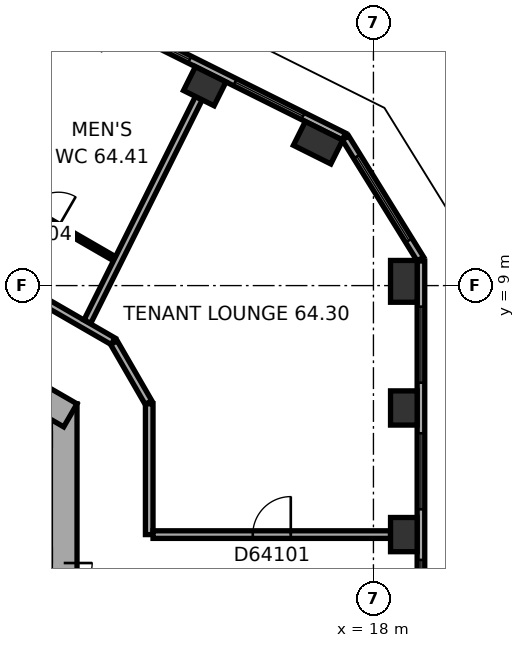
"""IFC4 building model, lengths in metres.
Left out: names, types, materials, properties, quantities, classifications, styles, units other than length and angle.
Written with IfcOpenShell. Run it as: python <this file> out.ifc"""

import sys

from ifc_helpers import new_model, si_unit, direction, frame, frame_2d, origin, origin_2d, place, context, subcontext, project, spatial, rectangle, extrude, element, fill, save


model = new_model("IFC4")
c1 = context("Model", 3, precision=1e-05, world=origin(), true_north=direction((0.0, 1.0)))
c2 = subcontext(c1, "Body", "Model", "MODEL_VIEW")
j1 = project(units=[si_unit("LENGTHUNIT", "METRE"), si_unit("PLANEANGLEUNIT", "RADIAN")], contexts=[c1])
p1 = place(None, origin())
s1 = spatial("IfcSite", under=j1, at=p1, CompositionType="ELEMENT")
p2 = place(p1, origin())
s2 = spatial("IfcBuilding", under=s1, at=p2, CompositionType="ELEMENT")
p3 = place(p2, frame((0.0, 0.0, 259.8)))
s3 = spatial("IfcBuildingStorey", under=s2, at=p3, CompositionType="ELEMENT", Elevation=259.8)
for number, where, z_axis, x_axis in (
    (1, (18.8, 2.448, 0.0), (0.0, 0.0, 1.0), (0.0, 1.0, 0.0)),
    (2, (18.8, 5.78, 0.0), (0.0, 0.0, 1.0), (0.0, 1.0, 0.0)),
):
    element("IfcColumn", number, at=place(p3, frame(where, z_axis=z_axis, x_axis=x_axis)), inside=s3, PredefinedType="COLUMN", context=c2, shape_type="SweptSolid", body=[
        extrude(rectangle(XDim=0.9, YDim=0.7, at=origin_2d()), origin(), (0.0, 0.0, 1.0), 3.7),
    ])
for number, where, z_axis, x_axis in (
    (3, (18.8, 9.112, 0.0), (0.0, 0.0, 1.0), (0.0, 1.0, 0.0)),
    (4, (16.543, 12.759, 0.0), (0.0, 0.0, 1.0), (-0.895, 0.446, 0.0)),
):
    element("IfcColumn", number, at=place(p3, frame(where, z_axis=z_axis, x_axis=x_axis)), inside=s3, PredefinedType="COLUMN", context=c2, shape_type="SweptSolid", body=[
        extrude(rectangle(XDim=1.1, YDim=0.7, at=origin_2d()), origin(), (0.0, 0.0, 1.0), 3.7),
    ])
p4 = place(p3, frame((13.561, 14.246, 0.0), z_axis=(0.0, 0.0, 1.0), x_axis=(-0.894934361602, 0.44619781311, 0.0)))
e5 = element("IfcColumn", 5, at=p4, inside=s3, PredefinedType="COLUMN", context=c2, shape_type="SweptSolid", body=[
    extrude(rectangle(XDim=0.9, YDim=0.7, at=origin_2d()), origin(), (0.0, 0.0, 1.0), 3.7),
])
p5 = place(p3, frame((9.85, -5.889, 0.0), z_axis=(0.0, 0.0, 1.0), x_axis=(0.0, 1.0, 0.0)))
e6 = element("IfcWall", 6, at=p5, inside=s3, PredefinedType="SHEAR", context=c2, shape_type="SweptSolid", body=[
    extrude(rectangle(XDim=11.778, YDim=0.7, at=frame_2d((5.889, 0.0))), origin(), (0.0, 0.0, 1.0), 3.7),
])
p6 = place(p5, frame((6.089, 0.0, 0.0)))
e7 = element("IfcOpeningElement", 7, at=p6, cuts=e6, PredefinedType="OPENING", context=c2, shape_type="SweptSolid", body=[
    extrude(rectangle(XDim=1.5, YDim=2.1, at=frame_2d((0.75, 1.05))), frame((0.0, 0.36, 0.0), z_axis=(0.0, -1.0, 0.0), x_axis=(1.0, 0.0, 0.0)), (0.0, 0.0, 1.0), 0.72),
])
p7 = place(p5, frame((2.939, 0.0, 0.0)))
e8 = element("IfcOpeningElement", 8, at=p7, cuts=e6, PredefinedType="OPENING", context=c2, shape_type="SweptSolid", body=[
    extrude(rectangle(XDim=0.9, YDim=2.1, at=frame_2d((0.45, 1.05))), frame((0.0, 0.36, 0.0), z_axis=(0.0, -1.0, 0.0), x_axis=(1.0, 0.0, 0.0)), (0.0, 0.0, 1.0), 0.72),
])
p8 = place(p3, frame((10.025, 5.586, 0.0), z_axis=(0.0, 0.0, 1.0), x_axis=(-0.866026453023, 0.499998182661, 0.0)))
e9 = element("IfcWall", 9, at=p8, inside=s3, PredefinedType="SHEAR", context=c2, shape_type="SweptSolid", body=[
    extrude(rectangle(XDim=11.778, YDim=0.7, at=frame_2d((5.889, 0.0))), origin(), (0.0, 0.0, 1.0), 3.7),
])
p9 = place(p8, frame((5.139, 0.0, 0.0)))
e10 = element("IfcOpeningElement", 10, at=p9, cuts=e9, PredefinedType="OPENING", context=c2, shape_type="SweptSolid", body=[
    extrude(rectangle(XDim=0.9, YDim=2.1, at=frame_2d((0.45, 1.05))), frame((0.0, 0.36, 0.0), z_axis=(0.0, -1.0, 0.0), x_axis=(1.0, 0.0, 0.0)), (0.0, 0.0, 1.0), 0.72),
])
p10 = place(p3, frame((19.25, -8.084, 0.0), z_axis=(0.0, 0.0, 1.0), x_axis=(0.0, 1.0, 0.0)))
e11 = element("IfcWall", 11, at=p10, inside=s3, PredefinedType="STANDARD", context=c2, shape_type="SweptSolid", body=[
    extrude(rectangle(XDim=17.731, YDim=0.2, at=frame_2d((8.866, 0.0))), origin(), (0.0, 0.0, 1.0), 3.7),
])
p11 = place(p10, frame((1.203, 0.0, 0.9)))
e12 = element("IfcOpeningElement", 12, at=p11, cuts=e11, PredefinedType="OPENING", context=c2, shape_type="SweptSolid", body=[
    extrude(rectangle(XDim=2.0, YDim=2.0, at=frame_2d((1.0, 1.0))), frame((0.0, 0.11, 0.0), z_axis=(0.0, -1.0, 0.0), x_axis=(1.0, 0.0, 0.0)), (0.0, 0.0, 1.0), 0.22),
])
p12 = place(p10, frame((4.535, 0.0, 0.9)))
e13 = element("IfcOpeningElement", 13, at=p12, cuts=e11, PredefinedType="OPENING", context=c2, shape_type="SweptSolid", body=[
    extrude(rectangle(XDim=2.0, YDim=2.0, at=frame_2d((1.0, 1.0))), frame((0.0, 0.11, 0.0), z_axis=(0.0, -1.0, 0.0), x_axis=(1.0, 0.0, 0.0)), (0.0, 0.0, 1.0), 0.22),
])
p13 = place(p10, frame((7.866, 0.0, 0.9)))
e14 = element("IfcOpeningElement", 14, at=p13, cuts=e11, PredefinedType="OPENING", context=c2, shape_type="SweptSolid", body=[
    extrude(rectangle(XDim=2.0, YDim=2.0, at=frame_2d((1.0, 1.0))), frame((0.0, 0.11, 0.0), z_axis=(0.0, -1.0, 0.0), x_axis=(1.0, 0.0, 0.0)), (0.0, 0.0, 1.0), 0.22),
])
p14 = place(p10, frame((11.198, 0.0, 0.9)))
e15 = element("IfcOpeningElement", 15, at=p14, cuts=e11, PredefinedType="OPENING", context=c2, shape_type="SweptSolid", body=[
    extrude(rectangle(XDim=2.0, YDim=2.0, at=frame_2d((1.0, 1.0))), frame((0.0, 0.11, 0.0), z_axis=(0.0, -1.0, 0.0), x_axis=(1.0, 0.0, 0.0)), (0.0, 0.0, 1.0), 0.22),
])
p15 = place(p10, frame((14.53, 0.0, 0.9)))
e16 = element("IfcOpeningElement", 16, at=p15, cuts=e11, PredefinedType="OPENING", context=c2, shape_type="SweptSolid", body=[
    extrude(rectangle(XDim=2.0, YDim=2.0, at=frame_2d((1.0, 1.0))), frame((0.0, 0.11, 0.0), z_axis=(0.0, -1.0, 0.0), x_axis=(1.0, 0.0, 0.0)), (0.0, 0.0, 1.0), 0.22),
])
p16 = place(p3, frame((19.235, 9.7, 0.0), z_axis=(0.0, 0.0, 1.0), x_axis=(-0.526233475464, 0.850340125656, 0.0)))
e17 = element("IfcWall", 17, at=p16, inside=s3, PredefinedType="STANDARD", context=c2, shape_type="SweptSolid", body=[
    extrude(rectangle(XDim=3.747, YDim=0.2, at=frame_2d((1.874, 0.0))), origin(), (0.0, 0.0, 1.0), 3.7),
])
p17 = place(p16, frame((0.573, 0.0, 0.9)))
e18 = element("IfcOpeningElement", 18, at=p17, cuts=e17, PredefinedType="OPENING", context=c2, shape_type="SweptSolid", body=[
    extrude(rectangle(XDim=2.6, YDim=2.0, at=frame_2d((1.3, 1.0))), frame((0.0, 0.11, 0.0), z_axis=(0.0, -1.0, 0.0), x_axis=(1.0, 0.0, 0.0)), (0.0, 0.0, 1.0), 0.22),
])
p18 = place(p3, frame((17.223, 12.923, 0.0), z_axis=(0.0, 0.0, 1.0), x_axis=(-0.894930561148, 0.44620543556, 0.0)))
e19 = element("IfcWall", 19, at=p18, inside=s3, PredefinedType="STANDARD", context=c2, shape_type="SweptSolid", body=[
    extrude(rectangle(XDim=17.731, YDim=0.2, at=frame_2d((8.866, 0.0))), origin(), (0.0, 0.0, 1.0), 3.7),
])
p19 = place(p18, frame((1.202, 0.0, 0.9)))
e20 = element("IfcOpeningElement", 20, at=p19, cuts=e19, PredefinedType="OPENING", context=c2, shape_type="SweptSolid", body=[
    extrude(rectangle(XDim=2.0, YDim=2.0, at=frame_2d((1.0, 1.0))), frame((0.0, 0.11, 0.0), z_axis=(0.0, -1.0, 0.0), x_axis=(1.0, 0.0, 0.0)), (0.0, 0.0, 1.0), 0.22),
])
p20 = place(p18, frame((4.533, 0.0, 0.9)))
e21 = element("IfcOpeningElement", 21, at=p20, cuts=e19, PredefinedType="OPENING", context=c2, shape_type="SweptSolid", body=[
    extrude(rectangle(XDim=2.0, YDim=2.0, at=frame_2d((1.0, 1.0))), frame((0.0, 0.11, 0.0), z_axis=(0.0, -1.0, 0.0), x_axis=(1.0, 0.0, 0.0)), (0.0, 0.0, 1.0), 0.22),
])
p21 = place(p18, frame((7.865, 0.0, 0.9)))
e22 = element("IfcOpeningElement", 22, at=p21, cuts=e19, PredefinedType="OPENING", context=c2, shape_type="SweptSolid", body=[
    extrude(rectangle(XDim=2.0, YDim=2.0, at=frame_2d((1.0, 1.0))), frame((0.0, 0.11, 0.0), z_axis=(0.0, -1.0, 0.0), x_axis=(1.0, 0.0, 0.0)), (0.0, 0.0, 1.0), 0.22),
])
p22 = place(p18, frame((11.197, 0.0, 0.9)))
e23 = element("IfcOpeningElement", 23, at=p22, cuts=e19, PredefinedType="OPENING", context=c2, shape_type="SweptSolid", body=[
    extrude(rectangle(XDim=2.0, YDim=2.0, at=frame_2d((1.0, 1.0))), frame((0.0, 0.11, 0.0), z_axis=(0.0, -1.0, 0.0), x_axis=(1.0, 0.0, 0.0)), (0.0, 0.0, 1.0), 0.22),
])
p23 = place(p18, frame((14.528, 0.0, 0.9)))
e24 = element("IfcOpeningElement", 24, at=p23, cuts=e19, PredefinedType="OPENING", context=c2, shape_type="SweptSolid", body=[
    extrude(rectangle(XDim=2.0, YDim=2.0, at=frame_2d((1.0, 1.0))), frame((0.0, 0.11, 0.0), z_axis=(0.0, -1.0, 0.0), x_axis=(1.0, 0.0, 0.0)), (0.0, 0.0, 1.0), 0.22),
])
p24 = place(p3, frame((10.072, 16.376, 0.0), z_axis=(0.0, 0.0, 1.0), x_axis=(-0.499972385701, -0.86604134632, 0.0)))
e25 = element("IfcWall", 25, at=p24, inside=s3, PredefinedType="PARTITIONING", context=c2, shape_type="SweptSolid", body=[
    extrude(rectangle(XDim=5.158, YDim=0.12, at=frame_2d((2.579, 0.0))), origin(), (0.0, 0.0, 1.0), 2.87),
])
p25 = place(p3, frame((11.15, 7.534, 0.0), z_axis=(0.0, 0.0, 1.0), x_axis=(-0.866026603062, 0.499997922785, 0.0)))
e26 = element("IfcWall", 26, at=p25, inside=s3, PredefinedType="PARTITIONING", context=c2, shape_type="SweptSolid", body=[
    extrude(rectangle(XDim=11.738, YDim=0.2, at=frame_2d((5.869, 0.0))), origin(), (0.0, 0.0, 1.0), 3.42),
])
p26 = place(p25, frame((5.345, 0.0, 0.0)))
e27 = element("IfcOpeningElement", 27, at=p26, cuts=e26, PredefinedType="OPENING", context=c2, shape_type="SweptSolid", body=[
    extrude(rectangle(XDim=1.0, YDim=2.1, at=frame_2d((0.5, 1.05))), frame((0.0, 0.11, 0.0), z_axis=(0.0, -1.0, 0.0), x_axis=(1.0, 0.0, 0.0)), (0.0, 0.0, 1.0), 0.22),
])
p27 = place(p3, frame((11.187, 9.707, 0.0), z_axis=(0.0, 0.0, 1.0), x_axis=(-0.866033133531, 0.499986611447, 0.0)))
e28 = element("IfcWall", 28, at=p27, inside=s3, PredefinedType="PARTITIONING", context=c2, shape_type="SweptSolid", body=[
    extrude(rectangle(XDim=9.814, YDim=0.12, at=frame_2d((4.907, 0.0))), origin(), (0.0, 0.0, 1.0), 3.42),
])
p28 = place(p27, frame((8.349, 0.0, 0.0)))
e29 = element("IfcOpeningElement", 29, at=p28, cuts=e28, PredefinedType="OPENING", context=c2, shape_type="SweptSolid", body=[
    extrude(rectangle(XDim=1.0, YDim=2.1, at=frame_2d((0.5, 1.05))), frame((0.0, 0.07, 0.0), z_axis=(0.0, -1.0, 0.0), x_axis=(1.0, 0.0, 0.0)), (0.0, 0.0, 1.0), 0.14),
])
p29 = place(p27, frame((1.7, 0.0, 0.0)))
e30 = element("IfcOpeningElement", 30, at=p29, cuts=e28, PredefinedType="OPENING", context=c2, shape_type="SweptSolid", body=[
    extrude(rectangle(XDim=0.9, YDim=2.1, at=frame_2d((0.45, 1.05))), frame((0.0, 0.07, 0.0), z_axis=(0.0, -1.0, 0.0), x_axis=(1.0, 0.0, 0.0)), (0.0, 0.0, 1.0), 0.14),
])
p30 = place(p27, frame((5.642, 0.0, 0.0)))
e31 = element("IfcOpeningElement", 31, at=p30, cuts=e28, PredefinedType="OPENING", context=c2, shape_type="SweptSolid", body=[
    extrude(rectangle(XDim=0.9, YDim=2.1, at=frame_2d((0.45, 1.05))), frame((0.0, 0.07, 0.0), z_axis=(0.0, -1.0, 0.0), x_axis=(1.0, 0.0, 0.0)), (0.0, 0.0, 1.0), 0.14),
])
p31 = place(p3, frame((12.08, 5.924, 0.0), z_axis=(0.0, 0.0, 1.0), x_axis=(-0.500004960326, 0.86602253992, 0.0)))
e32 = element("IfcWall", 32, at=p31, inside=s3, PredefinedType="PARTITIONING", context=c2, shape_type="SweptSolid", body=[
    extrude(rectangle(XDim=1.82, YDim=0.2, at=frame_2d((0.91, 0.0))), origin(), (0.0, 0.0, 1.0), 3.42),
])
p32 = place(p3, frame((12.1, 2.448, 0.0), z_axis=(0.0, 0.0, 1.0), x_axis=(0.0, 1.0, 0.0)))
e33 = element("IfcWall", 33, at=p32, inside=s3, PredefinedType="PARTITIONING", context=c2, shape_type="SweptSolid", body=[
    extrude(rectangle(XDim=3.441, YDim=0.2, at=frame_2d((1.72, 0.0))), origin(), (0.0, 0.0, 1.0), 3.42),
])
p33 = place(p3, frame((13.405, 13.933, 0.0), z_axis=(0.0, 0.0, 1.0), x_axis=(-0.446187838644, -0.894939334618, 0.0)))
e34 = element("IfcWall", 34, at=p33, inside=s3, PredefinedType="PARTITIONING", context=c2, shape_type="SweptSolid", body=[
    extrude(rectangle(XDim=6.571, YDim=0.2, at=frame_2d((3.286, 0.0))), origin(), (0.0, 0.0, 1.0), 3.42),
])
p34 = place(p3, frame((18.45, 2.448, 0.0), z_axis=(0.0, 0.0, 1.0), x_axis=(-1.0, 0.0, 0.0)))
e35 = element("IfcWall", 35, at=p34, inside=s3, PredefinedType="PARTITIONING", context=c2, shape_type="SweptSolid", body=[
    extrude(rectangle(XDim=6.25, YDim=0.2, at=frame_2d((3.125, 0.0))), origin(), (0.0, 0.0, 1.0), 3.42),
])
p35 = place(p34, frame((2.625, 0.0, 0.0)))
e36 = element("IfcOpeningElement", 36, at=p35, cuts=e35, PredefinedType="OPENING", context=c2, shape_type="SweptSolid", body=[
    extrude(rectangle(XDim=1.0, YDim=2.1, at=frame_2d((0.5, 1.05))), frame((0.0, 0.11, 0.0), z_axis=(0.0, -1.0, 0.0), x_axis=(1.0, 0.0, 0.0)), (0.0, 0.0, 1.0), 0.22),
])
p36 = place(p13, origin())
e37 = element("IfcWindow", 37, at=p36, inside=s3, PartitioningType="SINGLE_PANEL", PredefinedType="WINDOW", context=c2, shape_type="SweptSolid", body=[
    extrude(rectangle(XDim=2.0, YDim=2.0, at=frame_2d((1.0, 1.0))), frame((0.0, 0.03, 0.0), z_axis=(0.0, -1.0, 0.0), x_axis=(1.0, 0.0, 0.0)), (0.0, 0.0, 1.0), 0.06),
])
fill(e14, e37)
p37 = place(p14, origin())
e38 = element("IfcWindow", 38, at=p37, inside=s3, PartitioningType="SINGLE_PANEL", PredefinedType="WINDOW", context=c2, shape_type="SweptSolid", body=[
    extrude(rectangle(XDim=2.0, YDim=2.0, at=frame_2d((1.0, 1.0))), frame((0.0, 0.03, 0.0), z_axis=(0.0, -1.0, 0.0), x_axis=(1.0, 0.0, 0.0)), (0.0, 0.0, 1.0), 0.06),
])
fill(e15, e38)
p38 = place(p15, origin())
e39 = element("IfcWindow", 39, at=p38, inside=s3, PartitioningType="SINGLE_PANEL", PredefinedType="WINDOW", context=c2, shape_type="SweptSolid", body=[
    extrude(rectangle(XDim=2.0, YDim=2.0, at=frame_2d((1.0, 1.0))), frame((0.0, 0.03, 0.0), z_axis=(0.0, -1.0, 0.0), x_axis=(1.0, 0.0, 0.0)), (0.0, 0.0, 1.0), 0.06),
])
fill(e16, e39)
p39 = place(p17, origin())
e40 = element("IfcWindow", 40, at=p39, inside=s3, PartitioningType="SINGLE_PANEL", PredefinedType="WINDOW", context=c2, shape_type="SweptSolid", body=[
    extrude(rectangle(XDim=2.6, YDim=2.0, at=frame_2d((1.3, 1.0))), frame((0.0, 0.03, 0.0), z_axis=(0.0, -1.0, 0.0), x_axis=(1.0, 0.0, 0.0)), (0.0, 0.0, 1.0), 0.06),
])
fill(e18, e40)
p40 = place(p19, origin())
e41 = element("IfcWindow", 41, at=p40, inside=s3, PartitioningType="SINGLE_PANEL", PredefinedType="WINDOW", context=c2, shape_type="SweptSolid", body=[
    extrude(rectangle(XDim=2.0, YDim=2.0, at=frame_2d((1.0, 1.0))), frame((0.0, 0.03, 0.0), z_axis=(0.0, -1.0, 0.0), x_axis=(1.0, 0.0, 0.0)), (0.0, 0.0, 1.0), 0.06),
])
fill(e20, e41)
p41 = place(p20, origin())
e42 = element("IfcWindow", 42, at=p41, inside=s3, PartitioningType="SINGLE_PANEL", PredefinedType="WINDOW", context=c2, shape_type="SweptSolid", body=[
    extrude(rectangle(XDim=2.0, YDim=2.0, at=frame_2d((1.0, 1.0))), frame((0.0, 0.03, 0.0), z_axis=(0.0, -1.0, 0.0), x_axis=(1.0, 0.0, 0.0)), (0.0, 0.0, 1.0), 0.06),
])
fill(e21, e42)
p42 = place(p6, origin())
e43 = element("IfcDoor", 43, at=p42, inside=s3, OperationType="DOUBLE_DOOR_SINGLE_SWING", PredefinedType="DOOR", context=c2, shape_type="SweptSolid", body=[
    extrude(rectangle(XDim=1.5, YDim=2.1, at=frame_2d((0.75, 1.05))), frame((0.0, 0.025, 0.0), z_axis=(0.0, -1.0, 0.0), x_axis=(1.0, 0.0, 0.0)), (0.0, 0.0, 1.0), 0.05),
])
fill(e7, e43)
p43 = place(p35, origin())
e44 = element("IfcDoor", 44, at=p43, inside=s3, OperationType="SINGLE_SWING_LEFT", PredefinedType="DOOR", context=c2, shape_type="SweptSolid", body=[
    extrude(rectangle(XDim=1.0, YDim=2.1, at=frame_2d((0.5, 1.05))), frame((0.0, 0.025, 0.0), z_axis=(0.0, -1.0, 0.0), x_axis=(1.0, 0.0, 0.0)), (0.0, 0.0, 1.0), 0.05),
])
fill(e36, e44)
p44 = place(p29, origin())
e45 = element("IfcDoor", 45, at=p44, inside=s3, OperationType="SINGLE_SWING_LEFT", PredefinedType="DOOR", context=c2, shape_type="SweptSolid", body=[
    extrude(rectangle(XDim=0.9, YDim=2.1, at=frame_2d((0.45, 1.05))), frame((0.0, 0.025, 0.0), z_axis=(0.0, -1.0, 0.0), x_axis=(1.0, 0.0, 0.0)), (0.0, 0.0, 1.0), 0.05),
])
fill(e30, e45)
save(model, sys.argv[1])
